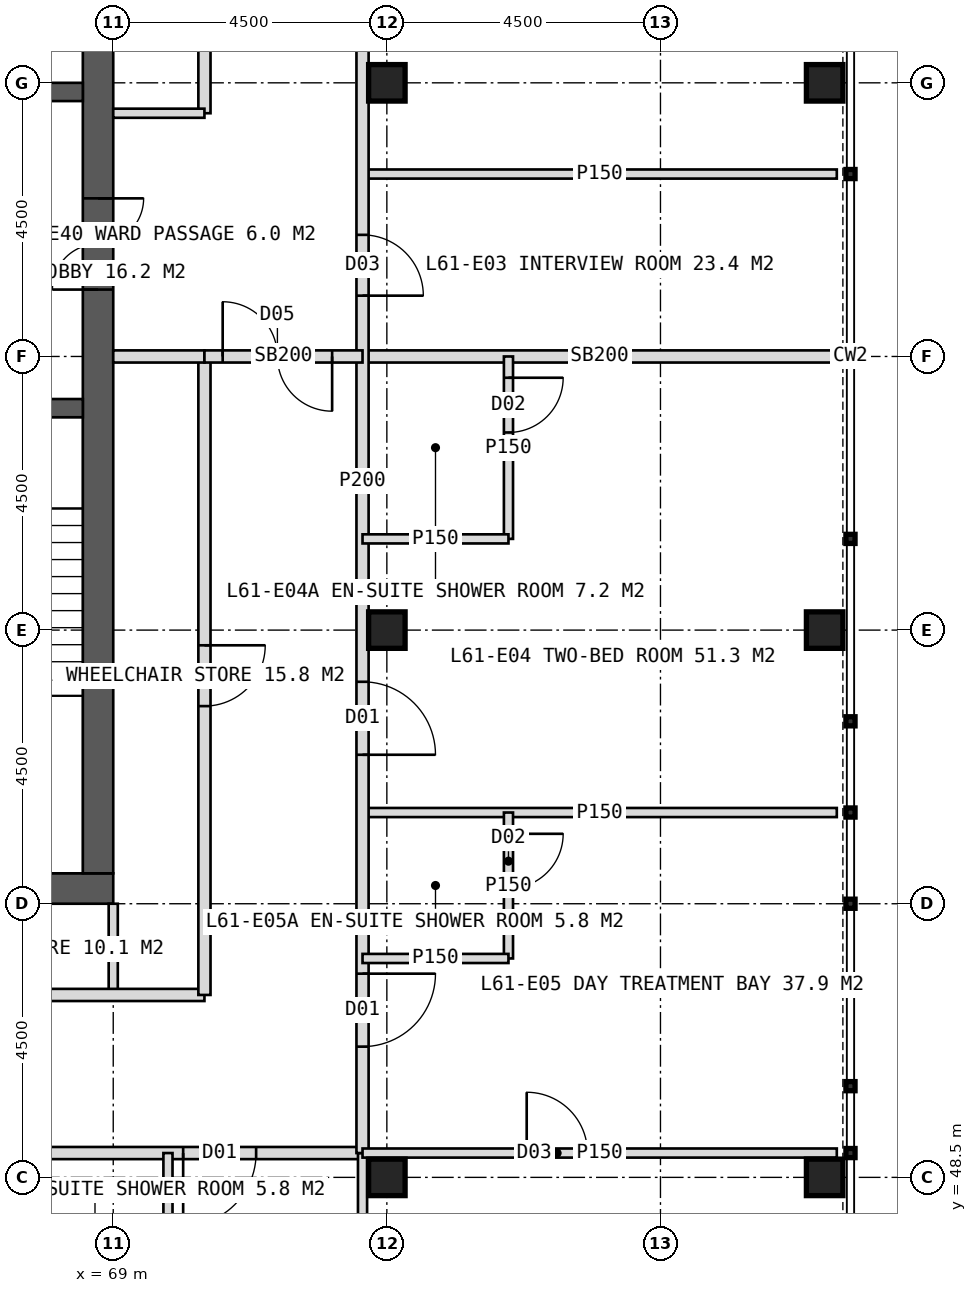
"""IFC4 building model, lengths in metres.
Left out: names, types, materials, properties, quantities, classifications, styles, units other than length and angle.
Written with IfcOpenShell. Run it as: python <this file> out.ifc"""

import sys

from ifc_helpers import new_model, si_unit, direction, frame, frame_2d, origin, origin_2d, place, context, subcontext, project, spatial, rectangle, hollow_rectangle, extrude, element, fill, save


model = new_model("IFC4")
c1 = context("Model", 3, precision=1e-05, world=origin(), true_north=direction((0.0, 1.0)))
c2 = subcontext(c1, "Body", "Model", "MODEL_VIEW")
j1 = project(units=[si_unit("LENGTHUNIT", "METRE"), si_unit("PLANEANGLEUNIT", "RADIAN")], contexts=[c1])
p1 = place(None, origin())
s1 = spatial("IfcSite", under=j1, at=p1, CompositionType="ELEMENT")
p2 = place(p1, origin())
s2 = spatial("IfcBuilding", under=s1, at=p2, CompositionType="ELEMENT")
p3 = place(p2, frame((0.0, 0.0, 254.0)))
s3 = spatial("IfcBuildingStorey", under=s2, at=p3, CompositionType="ELEMENT", Elevation=254.0)
p4 = place(p3, frame((51.0, 53.25, 0.0), z_axis=(0.0, 0.0, 1.0), x_axis=(1.0, 0.0, 0.0)))
e1 = element("IfcWall", 1, at=p4, inside=s3, PredefinedType="SHEAR", context=c2, shape_type="SweptSolid", body=[
    extrude(rectangle(XDim=18.0, YDim=0.5, at=frame_2d((9.0, 0.0))), origin(), (0.0, 0.0, 1.0), 4.0),
])
p5 = place(p4, frame((8.1, 0.0, 0.0)))
e2 = element("IfcOpeningElement", 2, at=p5, cuts=e1, PredefinedType="OPENING", context=c2, shape_type="SweptSolid", body=[
    extrude(rectangle(XDim=1.8, YDim=2.2, at=frame_2d((0.9, 1.1))), frame((0.0, 0.26, 0.0), z_axis=(0.0, -1.0, 0.0), x_axis=(1.0, 0.0, 0.0)), (0.0, 0.0, 1.0), 0.52),
])
p6 = place(p3, frame((68.75, 53.5, 0.0), z_axis=(0.0, 0.0, 1.0), x_axis=(0.0, 1.0, 0.0)))
e3 = element("IfcWall", 3, at=p6, inside=s3, PredefinedType="SHEAR", context=c2, shape_type="SweptSolid", body=[
    extrude(rectangle(XDim=17.0, YDim=0.5, at=frame_2d((8.5, 0.0))), origin(), (0.0, 0.0, 1.0), 4.0),
])
p7 = place(p6, frame((9.6, 0.0, 0.0)))
e4 = element("IfcOpeningElement", 4, at=p7, cuts=e3, PredefinedType="OPENING", context=c2, shape_type="SweptSolid", body=[
    extrude(rectangle(XDim=1.5, YDim=2.2, at=frame_2d((0.75, 1.1))), frame((0.0, 0.26, 0.0), z_axis=(0.0, -1.0, 0.0), x_axis=(1.0, 0.0, 0.0)), (0.0, 0.0, 1.0), 0.52),
])
p8 = place(p3, frame((65.2, 61.15, 0.0), z_axis=(0.0, 0.0, 1.0), x_axis=(1.0, 0.0, 0.0)))
e5 = element("IfcWall", 5, at=p8, inside=s3, PredefinedType="SHEAR", context=c2, shape_type="SweptSolid", body=[
    extrude(rectangle(XDim=3.3, YDim=0.3, at=frame_2d((1.65, 0.0))), origin(), (0.0, 0.0, 1.0), 4.0),
])
p9 = place(p8, frame((1.05, 0.0, 0.0)))
e6 = element("IfcOpeningElement", 6, at=p9, cuts=e5, PredefinedType="OPENING", context=c2, shape_type="SweptSolid", body=[
    extrude(rectangle(XDim=1.2, YDim=2.1, at=frame_2d((0.6, 1.05))), frame((0.0, 0.16, 0.0), z_axis=(0.0, -1.0, 0.0), x_axis=(1.0, 0.0, 0.0)), (0.0, 0.0, 1.0), 0.32),
])
p10 = place(p3, frame((65.2, 66.35, 0.0), z_axis=(0.0, 0.0, 1.0), x_axis=(1.0, 0.0, 0.0)))
e7 = element("IfcWall", 7, at=p10, inside=s3, PredefinedType="SHEAR", context=c2, shape_type="SweptSolid", body=[
    extrude(rectangle(XDim=3.3, YDim=0.3, at=frame_2d((1.65, 0.0))), origin(), (0.0, 0.0, 1.0), 4.0),
])
p11 = place(p10, frame((1.05, 0.0, 0.0)))
e8 = element("IfcOpeningElement", 8, at=p11, cuts=e7, PredefinedType="OPENING", context=c2, shape_type="SweptSolid", body=[
    extrude(rectangle(XDim=1.2, YDim=2.2, at=frame_2d((0.6, 1.1))), frame((0.0, 0.16, 0.0), z_axis=(0.0, -1.0, 0.0), x_axis=(1.0, 0.0, 0.0)), (0.0, 0.0, 1.0), 0.32),
])
for number, where, z_axis, x_axis in (
    (9, (73.5, 48.5, 0.0), (0.0, 0.0, 1.0), (1.0, 0.0, 0.0)),
    (10, (73.5, 57.5, 0.0), (0.0, 0.0, 1.0), (1.0, 0.0, 0.0)),
    (11, (73.5, 66.5, 0.0), (0.0, 0.0, 1.0), (1.0, 0.0, 0.0)),
    (12, (80.7, 48.5, 0.0), (0.0, 0.0, 1.0), (1.0, 0.0, 0.0)),
    (13, (80.7, 57.5, 0.0), (0.0, 0.0, 1.0), (1.0, 0.0, 0.0)),
    (14, (80.7, 66.5, 0.0), (0.0, 0.0, 1.0), (1.0, 0.0, 0.0)),
):
    element("IfcColumn", number, at=place(p3, frame(where, z_axis=z_axis, x_axis=x_axis)), inside=s3, PredefinedType="COLUMN", context=c2, shape_type="SweptSolid", body=[
        extrude(hollow_rectangle(XDim=0.6, YDim=0.6, WallThickness=0.04, at=origin_2d()), origin(), (0.0, 0.0, 1.0), 4.0),
    ])
p12 = place(p3, frame((73.1, 48.9, 0.0), z_axis=(0.0, 0.0, 1.0), x_axis=(-1.0, 0.0, 0.0)))
e15 = element("IfcWall", 15, at=p12, inside=s3, PredefinedType="PARTITIONING", context=c2, shape_type="SweptSolid", body=[
    extrude(rectangle(XDim=26.2, YDim=0.2, at=frame_2d((13.1, 0.0))), origin(), (0.0, 0.0, 1.0), 3.75),
])
p13 = place(p12, frame((1.75, 0.0, 0.0)))
e16 = element("IfcOpeningElement", 16, at=p13, cuts=e15, PredefinedType="OPENING", context=c2, shape_type="SweptSolid", body=[
    extrude(rectangle(XDim=1.2, YDim=2.2, at=frame_2d((0.6, 1.1))), frame((0.0, 0.11, 0.0), z_axis=(0.0, -1.0, 0.0), x_axis=(1.0, 0.0, 0.0)), (0.0, 0.0, 1.0), 0.22),
])
p14 = place(p12, frame((6.75, 0.0, 0.0)))
e17 = element("IfcOpeningElement", 17, at=p14, cuts=e15, PredefinedType="OPENING", context=c2, shape_type="SweptSolid", body=[
    extrude(rectangle(XDim=1.0, YDim=2.1, at=frame_2d((0.5, 1.05))), frame((0.0, 0.11, 0.0), z_axis=(0.0, -1.0, 0.0), x_axis=(1.0, 0.0, 0.0)), (0.0, 0.0, 1.0), 0.22),
])
p15 = place(p12, frame((11.1, 0.0, 0.0)))
e18 = element("IfcOpeningElement", 18, at=p15, cuts=e15, PredefinedType="OPENING", context=c2, shape_type="SweptSolid", body=[
    extrude(rectangle(XDim=1.0, YDim=2.1, at=frame_2d((0.5, 1.05))), frame((0.0, 0.11, 0.0), z_axis=(0.0, -1.0, 0.0), x_axis=(1.0, 0.0, 0.0)), (0.0, 0.0, 1.0), 0.22),
])
p16 = place(p12, frame((14.1, 0.0, 0.0)))
e19 = element("IfcOpeningElement", 19, at=p16, cuts=e15, PredefinedType="OPENING", context=c2, shape_type="SweptSolid", body=[
    extrude(rectangle(XDim=1.0, YDim=2.1, at=frame_2d((0.5, 1.05))), frame((0.0, 0.11, 0.0), z_axis=(0.0, -1.0, 0.0), x_axis=(1.0, 0.0, 0.0)), (0.0, 0.0, 1.0), 0.22),
])
p17 = place(p12, frame((18.45, 0.0, 0.0)))
e20 = element("IfcOpeningElement", 20, at=p17, cuts=e15, PredefinedType="OPENING", context=c2, shape_type="SweptSolid", body=[
    extrude(rectangle(XDim=1.0, YDim=2.1, at=frame_2d((0.5, 1.05))), frame((0.0, 0.11, 0.0), z_axis=(0.0, -1.0, 0.0), x_axis=(1.0, 0.0, 0.0)), (0.0, 0.0, 1.0), 0.22),
])
p18 = place(p12, frame((22.9, 0.0, 0.0)))
e21 = element("IfcOpeningElement", 21, at=p18, cuts=e15, PredefinedType="OPENING", context=c2, shape_type="SweptSolid", body=[
    extrude(rectangle(XDim=1.0, YDim=2.1, at=frame_2d((0.5, 1.05))), frame((0.0, 0.11, 0.0), z_axis=(0.0, -1.0, 0.0), x_axis=(1.0, 0.0, 0.0)), (0.0, 0.0, 1.0), 0.22),
])
p19 = place(p3, frame((73.1, 48.9, 0.0), z_axis=(0.0, 0.0, 1.0), x_axis=(0.0, -1.0, 0.0)))
e22 = element("IfcWall", 22, at=p19, inside=s3, PredefinedType="PARTITIONING", context=c2, shape_type="SweptSolid", body=[
    extrude(rectangle(XDim=7.8, YDim=0.15, at=frame_2d((3.9, 0.0))), origin(), (0.0, 0.0, 1.0), 3.75),
])
p20 = place(p3, frame((69.9, 48.9, 0.0), z_axis=(0.0, 0.0, 1.0), x_axis=(0.0, -1.0, 0.0)))
e23 = element("IfcWall", 23, at=p20, inside=s3, PredefinedType="PARTITIONING", context=c2, shape_type="SweptSolid", body=[
    extrude(rectangle(XDim=2.4, YDim=0.15, at=frame_2d((1.2, 0.0))), origin(), (0.0, 0.0, 1.0), 3.75),
])
p21 = place(p3, frame((69.0, 53.0, 0.0), z_axis=(0.0, 0.0, 1.0), x_axis=(0.0, -1.0, 0.0)))
e24 = element("IfcWall", 24, at=p21, inside=s3, PredefinedType="PARTITIONING", context=c2, shape_type="SweptSolid", body=[
    extrude(rectangle(XDim=1.5, YDim=0.15, at=frame_2d((0.75, 0.0))), origin(), (0.0, 0.0, 1.0), 3.75),
])
p22 = place(p3, frame((70.5, 51.5, 0.0), z_axis=(0.0, 0.0, 1.0), x_axis=(-1.0, 0.0, 0.0)))
e25 = element("IfcWall", 25, at=p22, inside=s3, PredefinedType="PARTITIONING", context=c2, shape_type="SweptSolid", body=[
    extrude(rectangle(XDim=8.25, YDim=0.2, at=frame_2d((4.125, 0.0))), origin(), (0.0, 0.0, 1.0), 3.75),
])
p23 = place(p22, frame((4.375, 0.0, 0.0)))
e26 = element("IfcOpeningElement", 26, at=p23, cuts=e25, PredefinedType="OPENING", context=c2, shape_type="SweptSolid", body=[
    extrude(rectangle(XDim=1.0, YDim=2.1, at=frame_2d((0.5, 1.05))), frame((0.0, 0.11, 0.0), z_axis=(0.0, -1.0, 0.0), x_axis=(1.0, 0.0, 0.0)), (0.0, 0.0, 1.0), 0.22),
])
p24 = place(p3, frame((73.1, 65.0, 0.0), z_axis=(0.0, 0.0, 1.0), x_axis=(1.0, 0.0, 0.0)))
e27 = element("IfcWall", 27, at=p24, inside=s3, PredefinedType="PARTITIONING", context=c2, shape_type="SweptSolid", body=[
    extrude(rectangle(XDim=7.8, YDim=0.15, at=frame_2d((3.9, 0.0))), origin(), (0.0, 0.0, 1.0), 3.75),
])
p25 = place(p3, frame((73.1, 62.0, 0.0), z_axis=(0.0, 0.0, 1.0), x_axis=(1.0, 0.0, 0.0)))
e28 = element("IfcWall", 28, at=p25, inside=s3, PredefinedType="SOLIDWALL", context=c2, shape_type="SweptSolid", body=[
    extrude(rectangle(XDim=7.8, YDim=0.2, at=frame_2d((3.9, 0.0))), origin(), (0.0, 0.0, 1.0), 2.75),
])
p26 = place(p3, frame((73.1, 54.5, 0.0), z_axis=(0.0, 0.0, 1.0), x_axis=(1.0, 0.0, 0.0)))
e29 = element("IfcWall", 29, at=p26, inside=s3, PredefinedType="PARTITIONING", context=c2, shape_type="SweptSolid", body=[
    extrude(rectangle(XDim=7.8, YDim=0.15, at=frame_2d((3.9, 0.0))), origin(), (0.0, 0.0, 1.0), 3.75),
])
p27 = place(p3, frame((73.1, 71.0, 0.0), z_axis=(0.0, 0.0, 1.0), x_axis=(0.0, -1.0, 0.0)))
e30 = element("IfcWall", 30, at=p27, inside=s3, PredefinedType="PARTITIONING", context=c2, shape_type="SweptSolid", body=[
    extrude(rectangle(XDim=22.1, YDim=0.2, at=frame_2d((11.05, 0.0))), origin(), (0.0, 0.0, 1.0), 3.75),
])
p28 = place(p27, frame((2.65, 0.0, 0.0)))
e31 = element("IfcOpeningElement", 31, at=p28, cuts=e30, PredefinedType="OPENING", context=c2, shape_type="SweptSolid", body=[
    extrude(rectangle(XDim=1.0, YDim=2.1, at=frame_2d((0.5, 1.05))), frame((0.0, 0.11, 0.0), z_axis=(0.0, -1.0, 0.0), x_axis=(1.0, 0.0, 0.0)), (0.0, 0.0, 1.0), 0.22),
])
p29 = place(p27, frame((7.0, 0.0, 0.0)))
e32 = element("IfcOpeningElement", 32, at=p29, cuts=e30, PredefinedType="OPENING", context=c2, shape_type="SweptSolid", body=[
    extrude(rectangle(XDim=1.0, YDim=2.1, at=frame_2d((0.5, 1.05))), frame((0.0, 0.11, 0.0), z_axis=(0.0, -1.0, 0.0), x_axis=(1.0, 0.0, 0.0)), (0.0, 0.0, 1.0), 0.22),
])
p30 = place(p27, frame((14.35, 0.0, 0.0)))
e33 = element("IfcOpeningElement", 33, at=p30, cuts=e30, PredefinedType="OPENING", context=c2, shape_type="SweptSolid", body=[
    extrude(rectangle(XDim=1.2, YDim=2.2, at=frame_2d((0.6, 1.1))), frame((0.0, 0.11, 0.0), z_axis=(0.0, -1.0, 0.0), x_axis=(1.0, 0.0, 0.0)), (0.0, 0.0, 1.0), 0.22),
])
p31 = place(p27, frame((19.15, 0.0, 0.0)))
e34 = element("IfcOpeningElement", 34, at=p31, cuts=e30, PredefinedType="OPENING", context=c2, shape_type="SweptSolid", body=[
    extrude(rectangle(XDim=1.2, YDim=2.2, at=frame_2d((0.6, 1.1))), frame((0.0, 0.11, 0.0), z_axis=(0.0, -1.0, 0.0), x_axis=(1.0, 0.0, 0.0)), (0.0, 0.0, 1.0), 0.22),
])
p32 = place(p3, frame((75.5, 62.0, 0.0), z_axis=(0.0, 0.0, 1.0), x_axis=(0.0, -1.0, 0.0)))
e35 = element("IfcWall", 35, at=p32, inside=s3, PredefinedType="PARTITIONING", context=c2, shape_type="SweptSolid", body=[
    extrude(rectangle(XDim=3.0, YDim=0.15, at=frame_2d((1.5, 0.0))), origin(), (0.0, 0.0, 1.0), 3.75),
])
p33 = place(p32, frame((0.35, 0.0, 0.0)))
e36 = element("IfcOpeningElement", 36, at=p33, cuts=e35, PredefinedType="OPENING", context=c2, shape_type="SweptSolid", body=[
    extrude(rectangle(XDim=0.9, YDim=2.1, at=frame_2d((0.45, 1.05))), frame((0.0, 0.085, 0.0), z_axis=(0.0, -1.0, 0.0), x_axis=(1.0, 0.0, 0.0)), (0.0, 0.0, 1.0), 0.17),
])
p34 = place(p3, frame((73.1, 59.0, 0.0), z_axis=(0.0, 0.0, 1.0), x_axis=(1.0, 0.0, 0.0)))
e37 = element("IfcWall", 37, at=p34, inside=s3, PredefinedType="PARTITIONING", context=c2, shape_type="SweptSolid", body=[
    extrude(rectangle(XDim=2.4, YDim=0.15, at=frame_2d((1.2, 0.0))), origin(), (0.0, 0.0, 1.0), 3.75),
])
p35 = place(p3, frame((73.1, 48.9, 0.0), z_axis=(0.0, 0.0, 1.0), x_axis=(1.0, 0.0, 0.0)))
e38 = element("IfcWall", 38, at=p35, inside=s3, PredefinedType="PARTITIONING", context=c2, shape_type="SweptSolid", body=[
    extrude(rectangle(XDim=7.8, YDim=0.15, at=frame_2d((3.9, 0.0))), origin(), (0.0, 0.0, 1.0), 3.75),
])
p36 = place(p35, frame((2.7, 0.0, 0.0)))
e39 = element("IfcOpeningElement", 39, at=p36, cuts=e38, PredefinedType="OPENING", context=c2, shape_type="SweptSolid", body=[
    extrude(rectangle(XDim=1.0, YDim=2.1, at=frame_2d((0.5, 1.05))), frame((0.0, 0.085, 0.0), z_axis=(0.0, -1.0, 0.0), x_axis=(1.0, 0.0, 0.0)), (0.0, 0.0, 1.0), 0.17),
])
p37 = place(p3, frame((75.5, 54.5, 0.0), z_axis=(0.0, 0.0, 1.0), x_axis=(0.0, -1.0, 0.0)))
e40 = element("IfcWall", 40, at=p37, inside=s3, PredefinedType="PARTITIONING", context=c2, shape_type="SweptSolid", body=[
    extrude(rectangle(XDim=2.4, YDim=0.15, at=frame_2d((1.2, 0.0))), origin(), (0.0, 0.0, 1.0), 3.75),
])
p38 = place(p37, frame((0.35, 0.0, 0.0)))
e41 = element("IfcOpeningElement", 41, at=p38, cuts=e40, PredefinedType="OPENING", context=c2, shape_type="SweptSolid", body=[
    extrude(rectangle(XDim=0.9, YDim=2.1, at=frame_2d((0.45, 1.05))), frame((0.0, 0.085, 0.0), z_axis=(0.0, -1.0, 0.0), x_axis=(1.0, 0.0, 0.0)), (0.0, 0.0, 1.0), 0.17),
])
p39 = place(p3, frame((73.1, 52.1, 0.0), z_axis=(0.0, 0.0, 1.0), x_axis=(1.0, 0.0, 0.0)))
e42 = element("IfcWall", 42, at=p39, inside=s3, PredefinedType="PARTITIONING", context=c2, shape_type="SweptSolid", body=[
    extrude(rectangle(XDim=2.4, YDim=0.15, at=frame_2d((1.2, 0.0))), origin(), (0.0, 0.0, 1.0), 3.75),
])
p40 = place(p3, frame((70.5, 72.5, 0.0), z_axis=(0.0, 0.0, 1.0), x_axis=(0.0, -1.0, 0.0)))
e43 = element("IfcWall", 43, at=p40, inside=s3, PredefinedType="PARTITIONING", context=c2, shape_type="SweptSolid", body=[
    extrude(rectangle(XDim=6.5, YDim=0.2, at=frame_2d((3.25, 0.0))), origin(), (0.0, 0.0, 1.0), 3.75),
])
p41 = place(p40, frame((3.5, 0.0, 0.0)))
e44 = element("IfcOpeningElement", 44, at=p41, cuts=e43, PredefinedType="OPENING", context=c2, shape_type="SweptSolid", body=[
    extrude(rectangle(XDim=1.0, YDim=2.1, at=frame_2d((0.5, 1.05))), frame((0.0, 0.11, 0.0), z_axis=(0.0, -1.0, 0.0), x_axis=(1.0, 0.0, 0.0)), (0.0, 0.0, 1.0), 0.22),
])
p42 = place(p3, frame((70.5, 62.0, 0.0), z_axis=(0.0, 0.0, 1.0), x_axis=(0.0, -1.0, 0.0)))
e45 = element("IfcWall", 45, at=p42, inside=s3, PredefinedType="PARTITIONING", context=c2, shape_type="SweptSolid", body=[
    extrude(rectangle(XDim=10.5, YDim=0.2, at=frame_2d((5.25, 0.0))), origin(), (0.0, 0.0, 1.0), 3.75),
])
p43 = place(p42, frame((4.75, 0.0, 0.0)))
e46 = element("IfcOpeningElement", 46, at=p43, cuts=e45, PredefinedType="OPENING", context=c2, shape_type="SweptSolid", body=[
    extrude(rectangle(XDim=1.0, YDim=2.1, at=frame_2d((0.5, 1.05))), frame((0.0, 0.11, 0.0), z_axis=(0.0, -1.0, 0.0), x_axis=(1.0, 0.0, 0.0)), (0.0, 0.0, 1.0), 0.22),
])
p44 = place(p3, frame((69.0, 66.0, 0.0), z_axis=(0.0, 0.0, 1.0), x_axis=(1.0, 0.0, 0.0)))
e47 = element("IfcWall", 47, at=p44, inside=s3, PredefinedType="PARTITIONING", context=c2, shape_type="SweptSolid", body=[
    extrude(rectangle(XDim=1.5, YDim=0.15, at=frame_2d((0.75, 0.0))), origin(), (0.0, 0.0, 1.0), 3.75),
])
p45 = place(p3, frame((69.0, 62.0, 0.0), z_axis=(0.0, 0.0, 1.0), x_axis=(1.0, 0.0, 0.0)))
e48 = element("IfcWall", 48, at=p45, inside=s3, PredefinedType="SOLIDWALL", context=c2, shape_type="SweptSolid", body=[
    extrude(rectangle(XDim=1.5, YDim=0.2, at=frame_2d((0.75, 0.0))), origin(), (0.0, 0.0, 1.0), 2.75),
])
p46 = place(p3, frame((70.5, 62.0, 0.0), z_axis=(0.0, 0.0, 1.0), x_axis=(1.0, 0.0, 0.0)))
e49 = element("IfcWall", 49, at=p46, inside=s3, PredefinedType="SOLIDWALL", context=c2, shape_type="SweptSolid", body=[
    extrude(rectangle(XDim=2.6, YDim=0.2, at=frame_2d((1.3, 0.0))), origin(), (0.0, 0.0, 1.0), 2.75),
])
p47 = place(p46, frame((0.3, 0.0, 0.0)))
e50 = element("IfcOpeningElement", 50, at=p47, cuts=e49, PredefinedType="OPENING", context=c2, shape_type="SweptSolid", body=[
    extrude(rectangle(XDim=1.8, YDim=2.2, at=frame_2d((0.9, 1.1))), frame((0.0, 0.11, 0.0), z_axis=(0.0, -1.0, 0.0), x_axis=(1.0, 0.0, 0.0)), (0.0, 0.0, 1.0), 0.22),
])
p48 = place(p13, origin())
e51 = element("IfcDoor", 51, at=p48, inside=s3, OperationType="SINGLE_SWING_RIGHT", PredefinedType="DOOR", context=c2, shape_type="SweptSolid", body=[
    extrude(rectangle(XDim=1.2, YDim=2.2, at=frame_2d((0.6, 1.1))), frame((0.0, 0.025, 0.0), z_axis=(0.0, -1.0, 0.0), x_axis=(1.0, 0.0, 0.0)), (0.0, 0.0, 1.0), 0.05),
])
fill(e16, e51)
p49 = place(p29, origin())
e52 = element("IfcDoor", 52, at=p49, inside=s3, OperationType="SINGLE_SWING_RIGHT", PredefinedType="DOOR", context=c2, shape_type="SweptSolid", body=[
    extrude(rectangle(XDim=1.0, YDim=2.1, at=frame_2d((0.5, 1.05))), frame((0.0, 0.025, 0.0), z_axis=(0.0, -1.0, 0.0), x_axis=(1.0, 0.0, 0.0)), (0.0, 0.0, 1.0), 0.05),
])
fill(e32, e52)
p50 = place(p30, origin())
e53 = element("IfcDoor", 53, at=p50, inside=s3, OperationType="SINGLE_SWING_RIGHT", PredefinedType="DOOR", context=c2, shape_type="SweptSolid", body=[
    extrude(rectangle(XDim=1.2, YDim=2.2, at=frame_2d((0.6, 1.1))), frame((0.0, 0.025, 0.0), z_axis=(0.0, -1.0, 0.0), x_axis=(1.0, 0.0, 0.0)), (0.0, 0.0, 1.0), 0.05),
])
fill(e33, e53)
p51 = place(p33, origin())
e54 = element("IfcDoor", 54, at=p51, inside=s3, OperationType="SINGLE_SWING_LEFT", PredefinedType="DOOR", context=c2, shape_type="SweptSolid", body=[
    extrude(rectangle(XDim=0.9, YDim=2.1, at=frame_2d((0.45, 1.05))), frame((0.0, 0.025, 0.0), z_axis=(0.0, -1.0, 0.0), x_axis=(1.0, 0.0, 0.0)), (0.0, 0.0, 1.0), 0.05),
])
fill(e36, e54)
p52 = place(p36, origin())
e55 = element("IfcDoor", 55, at=p52, inside=s3, OperationType="SINGLE_SWING_LEFT", PredefinedType="DOOR", context=c2, shape_type="SweptSolid", body=[
    extrude(rectangle(XDim=1.0, YDim=2.1, at=frame_2d((0.5, 1.05))), frame((0.0, 0.025, 0.0), z_axis=(0.0, -1.0, 0.0), x_axis=(1.0, 0.0, 0.0)), (0.0, 0.0, 1.0), 0.05),
])
fill(e39, e55)
p53 = place(p31, origin())
e56 = element("IfcDoor", 56, at=p53, inside=s3, OperationType="SINGLE_SWING_LEFT", PredefinedType="DOOR", context=c2, shape_type="SweptSolid", body=[
    extrude(rectangle(XDim=1.2, YDim=2.2, at=frame_2d((0.6, 1.1))), frame((0.0, 0.025, 0.0), z_axis=(0.0, -1.0, 0.0), x_axis=(1.0, 0.0, 0.0)), (0.0, 0.0, 1.0), 0.05),
])
fill(e34, e56)
p54 = place(p38, origin())
e57 = element("IfcDoor", 57, at=p54, inside=s3, OperationType="SINGLE_SWING_LEFT", PredefinedType="DOOR", context=c2, shape_type="SweptSolid", body=[
    extrude(rectangle(XDim=0.9, YDim=2.1, at=frame_2d((0.45, 1.05))), frame((0.0, 0.025, 0.0), z_axis=(0.0, -1.0, 0.0), x_axis=(1.0, 0.0, 0.0)), (0.0, 0.0, 1.0), 0.05),
])
fill(e41, e57)
p55 = place(p43, origin())
e58 = element("IfcDoor", 58, at=p55, inside=s3, OperationType="SINGLE_SWING_LEFT", PredefinedType="DOOR", context=c2, shape_type="SweptSolid", body=[
    extrude(rectangle(XDim=1.0, YDim=2.1, at=frame_2d((0.5, 1.05))), frame((0.0, 0.025, 0.0), z_axis=(0.0, -1.0, 0.0), x_axis=(1.0, 0.0, 0.0)), (0.0, 0.0, 1.0), 0.05),
])
fill(e46, e58)
p56 = place(p47, origin())
e59 = element("IfcDoor", 59, at=p56, inside=s3, OperationType="DOUBLE_DOOR_DOUBLE_SWING", PredefinedType="DOOR", context=c2, shape_type="SweptSolid", body=[
    extrude(rectangle(XDim=1.8, YDim=2.2, at=frame_2d((0.9, 1.1))), frame((0.0, 0.025, 0.0), z_axis=(0.0, -1.0, 0.0), x_axis=(1.0, 0.0, 0.0)), (0.0, 0.0, 1.0), 0.05),
])
fill(e50, e59)
p57 = place(p7, origin())
e60 = element("IfcDoor", 60, at=p57, inside=s3, OperationType="DOUBLE_DOOR_SINGLE_SWING", PredefinedType="DOOR", context=c2, shape_type="SweptSolid", body=[
    extrude(rectangle(XDim=1.5, YDim=2.2, at=frame_2d((0.75, 1.1))), frame((0.0, 0.025, 0.0), z_axis=(0.0, -1.0, 0.0), x_axis=(1.0, 0.0, 0.0)), (0.0, 0.0, 1.0), 0.05),
])
fill(e4, e60)
save(model, sys.argv[1])
